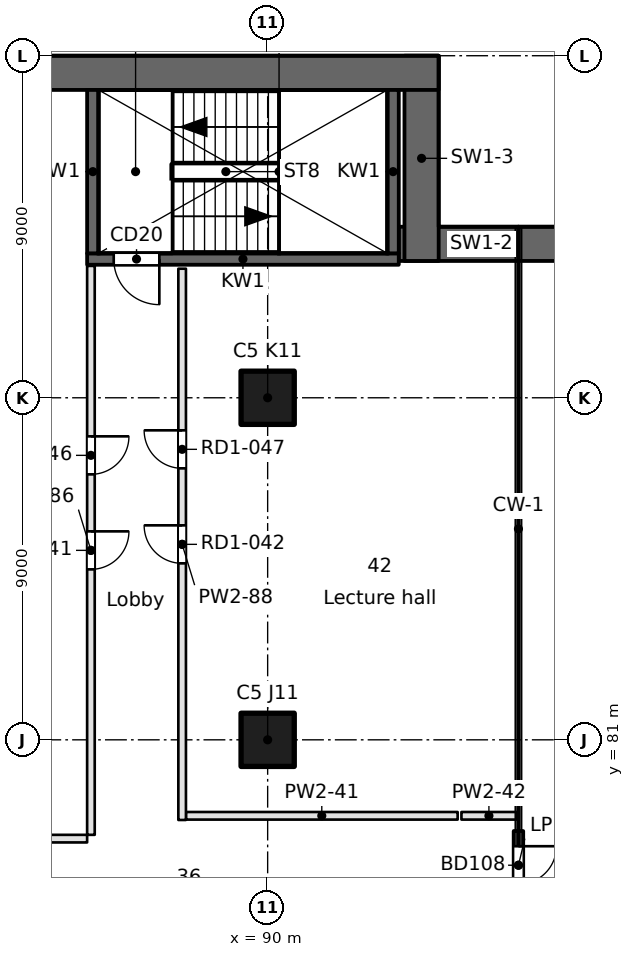
"""IFC4 building model, lengths in metres.
Left out: names, types, materials, properties, quantities, classifications, styles, units other than length and angle.
Written with IfcOpenShell. Run it as: python <this file> out.ifc"""

import sys

from ifc_helpers import new_model, si_unit, direction, frame, frame_2d, origin, origin_2d, place, context, subcontext, project, spatial, rectangle, extrude, element, fill, save


model = new_model("IFC4")
c1 = context("Model", 3, precision=1e-05, world=origin(), true_north=direction((0.0, 1.0)))
c2 = subcontext(c1, "Body", "Model", "MODEL_VIEW")
j1 = project(units=[si_unit("LENGTHUNIT", "METRE"), si_unit("PLANEANGLEUNIT", "RADIAN")], contexts=[c1])
p1 = place(None, origin())
s1 = spatial("IfcSite", under=j1, at=p1, CompositionType="ELEMENT")
p2 = place(p1, origin())
s2 = spatial("IfcBuilding", under=s1, at=p2, CompositionType="ELEMENT")
p3 = place(p2, frame((0.0, 0.0, 76.5)))
s3 = spatial("IfcBuildingStorey", under=s2, at=p3, CompositionType="ELEMENT", Elevation=76.5)
for number, where, z_axis, x_axis in (
    (1, (90.0, 81.0, 0.0), (0.0, 0.0, 1.0), (1.0, 0.0, 0.0)),
    (2, (90.0, 90.0, 0.0), (0.0, 0.0, 1.0), (1.0, 0.0, 0.0)),
):
    element("IfcColumn", number, at=place(p3, frame(where, z_axis=z_axis, x_axis=x_axis)), inside=s3, PredefinedType="COLUMN", context=c2, shape_type="SweptSolid", body=[
        extrude(rectangle(XDim=1.4, YDim=1.4, at=origin_2d()), origin(), (0.0, 0.0, 1.0), 3.7),
    ])
p4 = place(p3, frame((97.8, 94.05, 0.0), z_axis=(0.0, 0.0, 1.0), x_axis=(-1.0, 0.0, 0.0)))
e3 = element("IfcWall", 3, at=p4, inside=s3, PredefinedType="SHEAR", context=c2, shape_type="SweptSolid", body=[
    extrude(rectangle(XDim=4.351, YDim=0.9, at=frame_2d((2.175, 0.0))), origin(), (0.0, 0.0, 1.0), 3.7),
])
p5 = place(p3, frame((94.05, 93.6, 0.0), z_axis=(0.0, 0.0, 1.0), x_axis=(0.0, 1.0, 0.0)))
e4 = element("IfcWall", 4, at=p5, inside=s3, PredefinedType="SHEAR", context=c2, shape_type="SweptSolid", body=[
    extrude(rectangle(XDim=5.4, YDim=0.9, at=frame_2d((2.7, 0.0))), origin(), (0.0, 0.0, 1.0), 3.7),
])
p6 = place(p3, frame((94.5, 98.55, 0.0), z_axis=(0.0, 0.0, 1.0), x_axis=(-1.0, 0.0, 0.0)))
e5 = element("IfcWall", 5, at=p6, inside=s3, PredefinedType="SHEAR", context=c2, shape_type="SweptSolid", body=[
    extrude(rectangle(XDim=90.0, YDim=0.9, at=frame_2d((45.0, 0.0))), origin(), (0.0, 0.0, 1.0), 3.25),
])
p7 = place(p3, frame((96.599, 76.801, 0.0), z_axis=(0.0, 0.0, 1.0), x_axis=(0.0, 1.0, 0.0)))
e6 = element("IfcWall", 6, at=p7, inside=s3, PredefinedType="SOLIDWALL", context=c2, shape_type="SweptSolid", body=[
    extrude(rectangle(XDim=1.8, YDim=0.25, at=frame_2d((0.9, 0.0))), origin(), (0.0, 0.0, 1.0), 3.25),
])
p8 = place(p7, frame((0.4, 0.0, 0.0)))
e7 = element("IfcOpeningElement", 7, at=p8, cuts=e6, PredefinedType="OPENING", context=c2, shape_type="SweptSolid", body=[
    extrude(rectangle(XDim=1.0, YDim=2.1, at=frame_2d((0.5, 1.05))), frame((0.0, 0.125, 0.0), z_axis=(0.0, -1.0, 0.0), x_axis=(1.0, 0.0, 0.0)), (0.0, 0.0, 1.0), 0.25),
])
p9 = place(p3, frame((85.25, 93.65, -0.4), z_axis=(0.0, 0.0, 1.0), x_axis=(1.0, 0.0, 0.0)))
e8 = element("IfcWall", 8, at=p9, inside=s3, PredefinedType="SOLIDWALL", context=c2, shape_type="SweptSolid", body=[
    extrude(rectangle(XDim=8.2, YDim=0.3, at=frame_2d((4.1, 0.0))), origin(), (0.0, 0.0, 1.0), 3.65),
])
p10 = place(p9, frame((0.7, 0.0, 0.4)))
e9 = element("IfcOpeningElement", 9, at=p10, cuts=e8, PredefinedType="OPENING", context=c2, shape_type="SweptSolid", body=[
    extrude(rectangle(XDim=1.2, YDim=2.1, at=frame_2d((0.6, 1.05))), frame((0.0, 0.15, 0.0), z_axis=(0.0, -1.0, 0.0), x_axis=(1.0, 0.0, 0.0)), (0.0, 0.0, 1.0), 0.3),
])
for number, where, z_axis, x_axis in (
    (10, (85.4, 93.8, -0.4), (0.0, 0.0, 1.0), (0.0, 1.0, 0.0)),
    (11, (93.3, 93.8, -0.4), (0.0, 0.0, 1.0), (0.0, 1.0, 0.0)),
):
    element("IfcWall", number, at=place(p3, frame(where, z_axis=z_axis, x_axis=x_axis)), inside=s3, PredefinedType="SOLIDWALL", context=c2, shape_type="SweptSolid", body=[
        extrude(rectangle(XDim=4.3, YDim=0.3, at=frame_2d((2.15, 0.0))), origin(), (0.0, 0.0, 1.0), 3.65),
    ])
p11 = place(p3, frame((70.0, 78.4, 0.0), z_axis=(0.0, 0.0, 1.0), x_axis=(1.0, 0.0, 0.0)))
e12 = element("IfcWall", 12, at=p11, inside=s3, PredefinedType="PARTITIONING", context=c2, shape_type="SweptSolid", body=[
    extrude(rectangle(XDim=15.25, YDim=0.2, at=frame_2d((7.625, 0.0))), origin(), (0.0, 0.0, 1.0), 3.25),
])
p12 = place(p3, frame((87.85, 79.001, 0.0), z_axis=(0.0, 0.0, 1.0), x_axis=(1.0, 0.0, 0.0)))
e13 = element("IfcWall", 13, at=p12, inside=s3, PredefinedType="PARTITIONING", context=c2, shape_type="SweptSolid", body=[
    extrude(rectangle(XDim=7.149, YDim=0.2, at=frame_2d((3.574, 0.0))), origin(), (0.0, 0.0, 1.0), 3.25),
])
p13 = place(p3, frame((95.099, 79.001, 0.0), z_axis=(0.0, 0.0, 1.0), x_axis=(1.0, 0.0, 0.0)))
e14 = element("IfcWall", 14, at=p13, inside=s3, PredefinedType="PARTITIONING", context=c2, shape_type="SweptSolid", body=[
    extrude(rectangle(XDim=1.446, YDim=0.2, at=frame_2d((0.723, 0.0))), origin(), (0.0, 0.0, 1.0), 3.25),
])
p14 = place(p3, frame((85.35, 78.5, 0.0), z_axis=(0.0, 0.0, 1.0), x_axis=(0.0, 1.0, 0.0)))
e15 = element("IfcWall", 15, at=p14, inside=s3, PredefinedType="PARTITIONING", context=c2, shape_type="SweptSolid", body=[
    extrude(rectangle(XDim=14.97, YDim=0.2, at=frame_2d((7.485, 0.0))), origin(), (0.0, 0.0, 1.0), 3.25),
])
p15 = place(p14, frame((6.985, 0.0, 0.0)))
e16 = element("IfcOpeningElement", 16, at=p15, cuts=e15, PredefinedType="OPENING", context=c2, shape_type="SweptSolid", body=[
    extrude(rectangle(XDim=1.0, YDim=2.1, at=frame_2d((0.5, 1.05))), frame((0.0, 0.1, 0.0), z_axis=(0.0, -1.0, 0.0), x_axis=(1.0, 0.0, 0.0)), (0.0, 0.0, 1.0), 0.2),
])
p16 = place(p14, frame((9.485, 0.0, 0.0)))
e17 = element("IfcOpeningElement", 17, at=p16, cuts=e15, PredefinedType="OPENING", context=c2, shape_type="SweptSolid", body=[
    extrude(rectangle(XDim=1.0, YDim=2.1, at=frame_2d((0.5, 1.05))), frame((0.0, 0.1, 0.0), z_axis=(0.0, -1.0, 0.0), x_axis=(1.0, 0.0, 0.0)), (0.0, 0.0, 1.0), 0.2),
])
p17 = place(p3, frame((87.75, 93.396, 0.0), z_axis=(0.0, 0.0, 1.0), x_axis=(0.0, -1.0, 0.0)))
e18 = element("IfcWall", 18, at=p17, inside=s3, PredefinedType="PARTITIONING", context=c2, shape_type="SweptSolid", body=[
    extrude(rectangle(XDim=14.505, YDim=0.2, at=frame_2d((7.253, 0.0))), origin(), (0.0, 0.0, 1.0), 3.25),
])
p18 = place(p17, frame((6.753, 0.0, 0.0)))
e19 = element("IfcOpeningElement", 19, at=p18, cuts=e18, PredefinedType="OPENING", context=c2, shape_type="SweptSolid", body=[
    extrude(rectangle(XDim=1.0, YDim=2.1, at=frame_2d((0.5, 1.05))), frame((0.0, 0.1, 0.0), z_axis=(0.0, -1.0, 0.0), x_axis=(1.0, 0.0, 0.0)), (0.0, 0.0, 1.0), 0.2),
])
p19 = place(p17, frame((4.253, 0.0, 0.0)))
e20 = element("IfcOpeningElement", 20, at=p19, cuts=e18, PredefinedType="OPENING", context=c2, shape_type="SweptSolid", body=[
    extrude(rectangle(XDim=1.0, YDim=2.1, at=frame_2d((0.5, 1.05))), frame((0.0, 0.1, 0.0), z_axis=(0.0, -1.0, 0.0), x_axis=(1.0, 0.0, 0.0)), (0.0, 0.0, 1.0), 0.2),
])
p20 = place(p8, frame((1.0, 0.0, 0.0), z_axis=(0.0, 0.0, 1.0), x_axis=(-1.0, 0.0, 0.0)))
e21 = element("IfcDoor", 21, at=p20, inside=s3, OperationType="SINGLE_SWING_LEFT", PredefinedType="DOOR", context=c2, shape_type="SweptSolid", body=[
    extrude(rectangle(XDim=1.0, YDim=2.1, at=frame_2d((0.5, 1.05))), frame((0.0, 0.025, 0.0), z_axis=(0.0, -1.0, 0.0), x_axis=(1.0, 0.0, 0.0)), (0.0, 0.0, 1.0), 0.05),
])
fill(e7, e21)
p21 = place(p10, frame((1.2, 0.0, 0.0), z_axis=(0.0, 0.0, 1.0), x_axis=(-1.0, 0.0, 0.0)))
e22 = element("IfcDoor", 22, at=p21, inside=s3, OperationType="SINGLE_SWING_LEFT", PredefinedType="DOOR", context=c2, shape_type="SweptSolid", body=[
    extrude(rectangle(XDim=1.2, YDim=2.1, at=frame_2d((0.6, 1.05))), frame((0.0, 0.025, 0.0), z_axis=(0.0, -1.0, 0.0), x_axis=(1.0, 0.0, 0.0)), (0.0, 0.0, 1.0), 0.05),
])
fill(e9, e22)
p22 = place(p15, frame((1.0, 0.0, 0.0), z_axis=(0.0, 0.0, 1.0), x_axis=(-1.0, 0.0, 0.0)))
e23 = element("IfcDoor", 23, at=p22, inside=s3, OperationType="SINGLE_SWING_LEFT", PredefinedType="DOOR", context=c2, shape_type="SweptSolid", body=[
    extrude(rectangle(XDim=1.0, YDim=2.1, at=frame_2d((0.5, 1.05))), frame((0.0, 0.025, 0.0), z_axis=(0.0, -1.0, 0.0), x_axis=(1.0, 0.0, 0.0)), (0.0, 0.0, 1.0), 0.05),
])
fill(e16, e23)
p23 = place(p18, frame((1.0, 0.0, 0.0), z_axis=(0.0, 0.0, 1.0), x_axis=(-1.0, 0.0, 0.0)))
e24 = element("IfcDoor", 24, at=p23, inside=s3, OperationType="SINGLE_SWING_RIGHT", PredefinedType="DOOR", context=c2, shape_type="SweptSolid", body=[
    extrude(rectangle(XDim=1.0, YDim=2.1, at=frame_2d((0.5, 1.05))), frame((0.0, 0.025, 0.0), z_axis=(0.0, -1.0, 0.0), x_axis=(1.0, 0.0, 0.0)), (0.0, 0.0, 1.0), 0.05),
])
fill(e19, e24)
p24 = place(p16, frame((1.0, 0.0, 0.0), z_axis=(0.0, 0.0, 1.0), x_axis=(-1.0, 0.0, 0.0)))
e25 = element("IfcDoor", 25, at=p24, inside=s3, OperationType="SINGLE_SWING_LEFT", PredefinedType="DOOR", context=c2, shape_type="SweptSolid", body=[
    extrude(rectangle(XDim=1.0, YDim=2.1, at=frame_2d((0.5, 1.05))), frame((0.0, 0.025, 0.0), z_axis=(0.0, -1.0, 0.0), x_axis=(1.0, 0.0, 0.0)), (0.0, 0.0, 1.0), 0.05),
])
fill(e17, e25)
p25 = place(p19, frame((1.0, 0.0, 0.0), z_axis=(0.0, 0.0, 1.0), x_axis=(-1.0, 0.0, 0.0)))
e26 = element("IfcDoor", 26, at=p25, inside=s3, OperationType="SINGLE_SWING_RIGHT", PredefinedType="DOOR", context=c2, shape_type="SweptSolid", body=[
    extrude(rectangle(XDim=1.0, YDim=2.1, at=frame_2d((0.5, 1.05))), frame((0.0, 0.025, 0.0), z_axis=(0.0, -1.0, 0.0), x_axis=(1.0, 0.0, 0.0)), (0.0, 0.0, 1.0), 0.05),
])
fill(e20, e26)
save(model, sys.argv[1])
